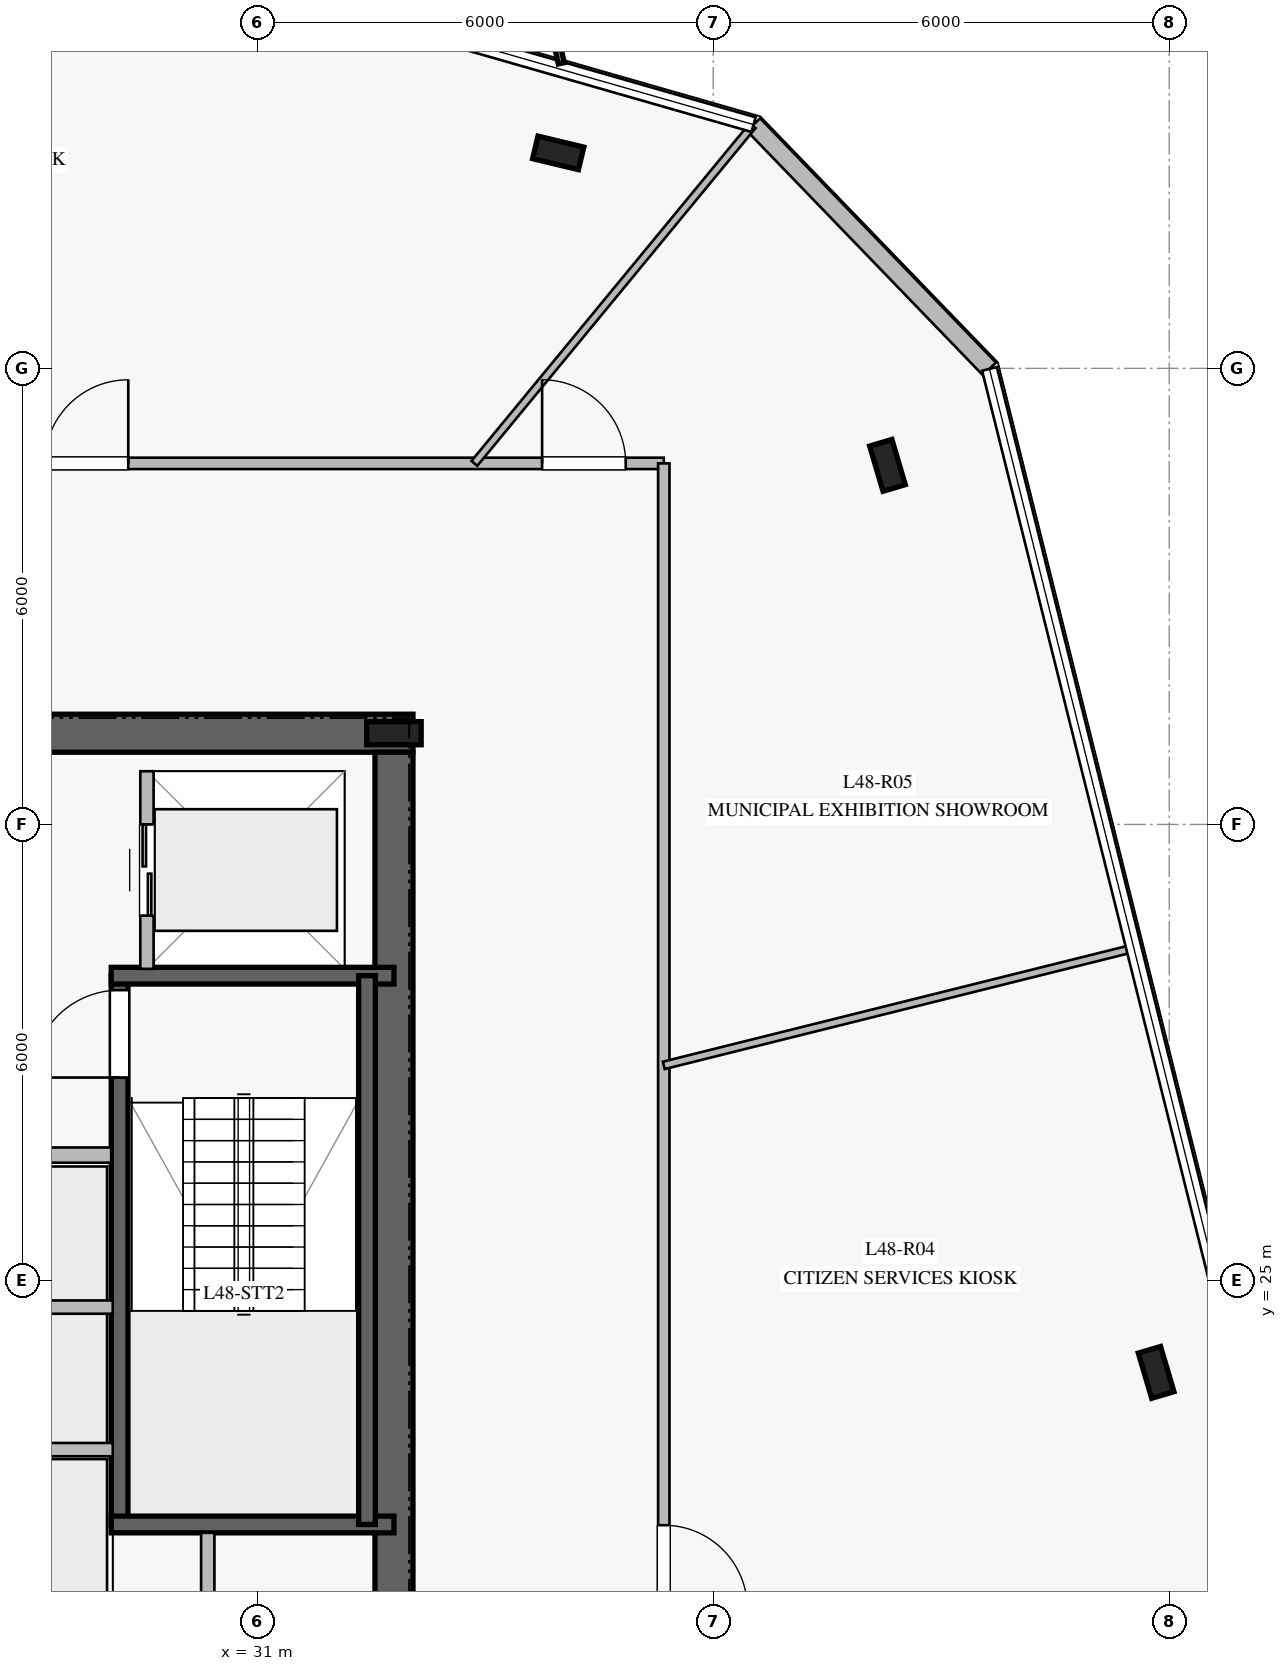
"""IFC4 building model, lengths in metres.
Left out: names, types, materials, properties, quantities, classifications, styles, units other than length and angle.
Written with IfcOpenShell. Run it as: python <this file> out.ifc"""

import sys

from ifc_helpers import new_model, si_unit, direction, frame, frame_2d, origin, origin_2d, place, context, subcontext, project, spatial, rectangle, i_section, extrude, element, fill, save


model = new_model("IFC4")
c1 = context("Model", 3, precision=1e-05, world=origin(), true_north=direction((0.0, 1.0)))
c2 = subcontext(c1, "Body", "Model", "MODEL_VIEW")
j1 = project(units=[si_unit("LENGTHUNIT", "METRE"), si_unit("PLANEANGLEUNIT", "RADIAN")], contexts=[c1])
p1 = place(None, origin())
s1 = spatial("IfcSite", under=j1, at=p1, CompositionType="ELEMENT")
p2 = place(p1, origin())
s2 = spatial("IfcBuilding", under=s1, at=p2, CompositionType="ELEMENT")
p3 = place(p2, frame((0.0, 0.0, 200.8)))
s3 = spatial("IfcBuildingStorey", under=s2, at=p3, CompositionType="ELEMENT", Elevation=200.8)
p4 = place(p3, frame((33.05, 32.2, 0.0), z_axis=(0.0, 0.0, 1.0), x_axis=(-1.0, 0.0, 0.0)))
e1 = element("IfcWall", 1, at=p4, inside=s3, PredefinedType="SHEAR", context=c2, shape_type="SweptSolid", body=[
    extrude(rectangle(XDim=16.1, YDim=0.5, at=frame_2d((8.05, 0.0))), origin(), (0.0, 0.0, 1.0), 3.78),
])
p5 = place(p4, frame((5.0, 0.0, 0.0)))
e2 = element("IfcOpeningElement", 2, at=p5, cuts=e1, PredefinedType="OPENING", context=c2, shape_type="SweptSolid", body=[
    extrude(rectangle(XDim=1.2, YDim=2.25, at=frame_2d((0.6, 1.125))), frame((0.0, 0.26, 0.0), z_axis=(0.0, -1.0, 0.0), x_axis=(1.0, 0.0, 0.0)), (0.0, 0.0, 1.0), 0.52),
])
p6 = place(p4, frame((9.825, 0.0, 0.0)))
e3 = element("IfcOpeningElement", 3, at=p6, cuts=e1, PredefinedType="OPENING", context=c2, shape_type="SweptSolid", body=[
    extrude(rectangle(XDim=1.1, YDim=2.2, at=frame_2d((0.55, 1.1))), frame((0.0, 0.26, 0.0), z_axis=(0.0, -1.0, 0.0), x_axis=(1.0, 0.0, 0.0)), (0.0, 0.0, 1.0), 0.52),
])
p7 = place(p3, frame((32.8, 18.05, 0.0), z_axis=(0.0, 0.0, 1.0), x_axis=(0.0, 1.0, 0.0)))
e4 = element("IfcWall", 4, at=p7, inside=s3, PredefinedType="SHEAR", context=c2, shape_type="SweptSolid", body=[
    extrude(rectangle(XDim=13.9, YDim=0.5, at=frame_2d((6.95, 0.0))), origin(), (0.0, 0.0, 1.0), 3.78),
])
p8 = place(p3, frame((32.8, 32.2, 0.0), z_axis=(0.0, 0.0, 1.0), x_axis=(1.0, 0.0, 0.0)))
e5 = element("IfcColumn", 5, at=p8, inside=s3, PredefinedType="COLUMN", context=c2, shape_type="SweptSolid", body=[
    extrude(i_section(OverallWidth=0.304, OverallDepth=0.716, WebThickness=0.021, FlangeThickness=0.04, at=origin_2d()), origin(), (0.0, 0.0, 1.0), 4.0),
])
p9 = place(p3, frame((29.19, 21.79, 0.0), z_axis=(0.0, 0.0, 1.0), x_axis=(0.0, 1.0, 0.0)))
e6 = element("IfcWall", 6, at=p9, inside=s3, PredefinedType="SOLIDWALL", context=c2, shape_type="SweptSolid", body=[
    extrude(rectangle(XDim=7.22, YDim=0.22, at=frame_2d((3.61, 0.0))), origin(), (0.0, 0.0, 1.0), 3.78),
])
p10 = place(p9, frame((5.88, 0.0, 0.0)))
e7 = element("IfcOpeningElement", 7, at=p10, cuts=e6, PredefinedType="OPENING", context=c2, shape_type="SweptSolid", body=[
    extrude(rectangle(XDim=1.15, YDim=2.2, at=frame_2d((0.575, 1.1))), frame((0.0, 0.12, 0.0), z_axis=(0.0, -1.0, 0.0), x_axis=(1.0, 0.0, 0.0)), (0.0, 0.0, 1.0), 0.24),
])
for number, where, z_axis, x_axis in (
    (8, (29.08, 21.79, 0.0), (0.0, 0.0, 1.0), (1.0, 0.0, 0.0)),
    (9, (29.08, 29.01, 0.0), (0.0, 0.0, 1.0), (1.0, 0.0, 0.0)),
):
    element("IfcWall", number, at=place(p3, frame(where, z_axis=z_axis, x_axis=x_axis)), inside=s3, PredefinedType="SOLIDWALL", context=c2, shape_type="SweptSolid", body=[
        extrude(rectangle(XDim=3.72, YDim=0.22, at=frame_2d((1.86, 0.0))), origin(), (0.0, 0.0, 1.0), 3.78),
    ])
p11 = place(p3, frame((32.445, 29.01, 0.0), z_axis=(0.0, 0.0, 1.0), x_axis=(0.0, -1.0, 0.0)))
e10 = element("IfcWall", 10, at=p11, inside=s3, PredefinedType="SOLIDWALL", context=c2, shape_type="SweptSolid", body=[
    extrude(rectangle(XDim=7.22, YDim=0.22, at=frame_2d((3.61, 0.0))), origin(), (0.0, 0.0, 1.0), 3.78),
])
for number, where, z_axis, x_axis in (
    (11, (34.961, 39.835, 0.0), (0.0, 0.0, 1.0), (-0.972, 0.233, 0.0)),
    (12, (42.828, 23.791, 0.0), (0.0, 0.0, 1.0), (-0.284, 0.959, 0.0)),
    (13, (39.293, 35.724, 0.0), (0.0, 0.0, 1.0), (-0.284, 0.959, 0.0)),
):
    element("IfcColumn", number, at=place(p3, frame(where, z_axis=z_axis, x_axis=x_axis)), inside=s3, PredefinedType="COLUMN", context=c2, shape_type="SweptSolid", body=[
        extrude(i_section(OverallWidth=0.305, OverallDepth=0.62, WebThickness=0.021, FlangeThickness=0.04, at=origin_2d()), origin(), (0.0, 0.0, 1.0), 4.0),
    ])
p12 = place(p3, frame((43.204, 17.457, 0.0), z_axis=(0.0, 0.0, 1.0), x_axis=(0.275572820258, 0.961280198868, 0.0)))
e14 = element("IfcWall", 14, at=p12, inside=s3, PredefinedType="STANDARD", context=c2, shape_type="SweptSolid", body=[
    extrude(rectangle(XDim=4.467, YDim=0.24, at=frame_2d((2.233, 0.0))), origin(), (0.0, 0.0, 1.0), 3.78),
])
p13 = place(p3, frame((40.635, 36.993, 0.0), z_axis=(0.0, 0.0, 1.0), x_axis=(-0.69467836701, 0.719320489357, 0.0)))
e15 = element("IfcWall", 15, at=p13, inside=s3, PredefinedType="STANDARD", context=c2, shape_type="SweptSolid", body=[
    extrude(rectangle(XDim=4.468, YDim=0.24, at=frame_2d((2.234, 0.0))), origin(), (0.0, 0.0, 1.0), 3.78),
])
p14 = place(p3, frame((25.7, 26.65, 0.0), z_axis=(0.0, 0.0, 1.0), x_axis=(1.0, 0.0, 0.0)))
e16 = element("IfcWall", 16, at=p14, inside=s3, PredefinedType="PARTITIONING", context=c2, shape_type="SweptSolid", body=[
    extrude(rectangle(XDim=3.38, YDim=0.2, at=frame_2d((1.69, 0.0))), origin(), (0.0, 0.0, 1.0), 3.78),
])
p15 = place(p3, frame((30.35, 18.2, 0.0), z_axis=(0.0, 0.0, 1.0), x_axis=(0.0, 1.0, 0.0)))
e17 = element("IfcWall", 17, at=p15, inside=s3, PredefinedType="PARTITIONING", context=c2, shape_type="SweptSolid", body=[
    extrude(rectangle(XDim=3.48, YDim=0.175, at=frame_2d((1.74, 0.0))), origin(), (0.0, 0.0, 1.0), 3.78),
])
for number, where, z_axis, x_axis in (
    (18, (26.75, 22.775, 0.0), (0.0, 0.0, 1.0), (1.0, 0.0, 0.0)),
    (19, (26.75, 24.65, 0.0), (0.0, 0.0, 1.0), (1.0, 0.0, 0.0)),
):
    element("IfcWall", number, at=place(p3, frame(where, z_axis=z_axis, x_axis=x_axis)), inside=s3, PredefinedType="PARTITIONING", context=c2, shape_type="SweptSolid", body=[
        extrude(rectangle(XDim=2.35, YDim=0.175, at=frame_2d((1.175, 0.0))), origin(), (0.0, 0.0, 1.0), 3.78),
    ])
p16 = place(p3, frame((29.55, 29.1, 0.0), z_axis=(0.0, 0.0, 1.0), x_axis=(0.0, 1.0, 0.0)))
e20 = element("IfcWall", 20, at=p16, inside=s3, PredefinedType="PARTITIONING", context=c2, shape_type="SweptSolid", body=[
    extrude(rectangle(XDim=2.6, YDim=0.175, at=frame_2d((1.3, 0.0))), origin(), (0.0, 0.0, 1.0), 3.78),
])
p17 = place(p16, frame((0.7, 0.0, 0.0)))
e21 = element("IfcOpeningElement", 21, at=p17, cuts=e20, PredefinedType="OPENING", context=c2, shape_type="SweptSolid", body=[
    extrude(rectangle(XDim=1.2, YDim=2.2, at=frame_2d((0.6, 1.1))), frame((0.0, 0.098, 0.0), z_axis=(0.0, -1.0, 0.0), x_axis=(1.0, 0.0, 0.0)), (0.0, 0.0, 1.0), 0.195),
])
p18 = place(p3, frame((13.65, 35.75, 0.0), z_axis=(0.0, 0.0, 1.0), x_axis=(1.0, 0.0, 0.0)))
e22 = element("IfcWall", 22, at=p18, inside=s3, PredefinedType="PARTITIONING", context=c2, shape_type="SweptSolid", body=[
    extrude(rectangle(XDim=22.7, YDim=0.15, at=frame_2d((11.35, 0.0))), origin(), (0.0, 0.0, 1.0), 3.28),
])
p19 = place(p18, frame((21.099, 0.0, 0.0)))
e23 = element("IfcOpeningElement", 23, at=p19, cuts=e22, PredefinedType="OPENING", context=c2, shape_type="SweptSolid", body=[
    extrude(rectangle(XDim=1.1, YDim=2.2, at=frame_2d((0.55, 1.1))), frame((0.0, 0.085, 0.0), z_axis=(0.0, -1.0, 0.0), x_axis=(1.0, 0.0, 0.0)), (0.0, 0.0, 1.0), 0.17),
])
p20 = place(p18, frame((14.554, 0.0, 0.0)))
e24 = element("IfcOpeningElement", 24, at=p20, cuts=e22, PredefinedType="OPENING", context=c2, shape_type="SweptSolid", body=[
    extrude(rectangle(XDim=1.1, YDim=2.2, at=frame_2d((0.55, 1.1))), frame((0.0, 0.085, 0.0), z_axis=(0.0, -1.0, 0.0), x_axis=(1.0, 0.0, 0.0)), (0.0, 0.0, 1.0), 0.17),
])
p21 = place(p18, frame((4.597, 0.0, 0.0)))
e25 = element("IfcOpeningElement", 25, at=p21, cuts=e22, PredefinedType="OPENING", context=c2, shape_type="SweptSolid", body=[
    extrude(rectangle(XDim=1.1, YDim=2.2, at=frame_2d((0.55, 1.1))), frame((0.0, 0.085, 0.0), z_axis=(0.0, -1.0, 0.0), x_axis=(1.0, 0.0, 0.0)), (0.0, 0.0, 1.0), 0.17),
])
p22 = place(p3, frame((36.35, 35.75, 0.0), z_axis=(0.0, 0.0, 1.0), x_axis=(0.0, -1.0, 0.0)))
e26 = element("IfcWall", 26, at=p22, inside=s3, PredefinedType="PARTITIONING", context=c2, shape_type="SweptSolid", body=[
    extrude(rectangle(XDim=21.5, YDim=0.15, at=frame_2d((10.75, 0.0))), origin(), (0.0, 0.0, 1.0), 3.05),
])
p23 = place(p22, frame((13.969, 0.0, 0.0)))
e27 = element("IfcOpeningElement", 27, at=p23, cuts=e26, PredefinedType="OPENING", context=c2, shape_type="SweptSolid", body=[
    extrude(rectangle(XDim=1.1, YDim=2.2, at=frame_2d((0.55, 1.1))), frame((0.0, 0.085, 0.0), z_axis=(0.0, -1.0, 0.0), x_axis=(1.0, 0.0, 0.0)), (0.0, 0.0, 1.0), 0.17),
])
p24 = place(p3, frame((36.35, 27.83, 0.0), z_axis=(0.0, 0.0, 1.0), x_axis=(0.970304919619, 0.241885020131, 0.0)))
e28 = element("IfcWall", 28, at=p24, inside=s3, PredefinedType="MOVABLE", context=c2, shape_type="SweptSolid", body=[
    extrude(rectangle(XDim=6.358, YDim=0.1, at=frame_2d((3.179, 0.0))), origin(), (0.0, 0.0, 1.0), 3.05),
])
p25 = place(p3, frame((33.858, 35.75, 0.0), z_axis=(0.0, 0.0, 1.0), x_axis=(0.635924242857, 0.77175148678, 0.0)))
e29 = element("IfcWall", 29, at=p25, inside=s3, PredefinedType="MOVABLE", context=c2, shape_type="SweptSolid", body=[
    extrude(rectangle(XDim=5.757, YDim=0.1, at=frame_2d((2.878, 0.0))), origin(), (0.0, 0.0, 1.0), 3.18),
])
p26 = place(p10, origin())
e30 = element("IfcDoor", 30, at=p26, inside=s3, OperationType="SINGLE_SWING_LEFT", PredefinedType="DOOR", context=c2, shape_type="SweptSolid", body=[
    extrude(rectangle(XDim=1.15, YDim=2.2, at=frame_2d((0.575, 1.1))), frame((0.0, 0.025, 0.0), z_axis=(0.0, -1.0, 0.0), x_axis=(1.0, 0.0, 0.0)), (0.0, 0.0, 1.0), 0.05),
])
fill(e7, e30)
p27 = place(p17, origin())
e31 = element("IfcDoor", 31, at=p27, inside=s3, OperationType="DOUBLE_DOOR_SLIDING", PredefinedType="DOOR", context=c2, shape_type="SweptSolid", body=[
    extrude(rectangle(XDim=1.2, YDim=2.2, at=frame_2d((0.6, 1.1))), frame((0.0, 0.025, 0.0), z_axis=(0.0, -1.0, 0.0), x_axis=(1.0, 0.0, 0.0)), (0.0, 0.0, 1.0), 0.05),
])
fill(e21, e31)
p28 = place(p23, origin())
e32 = element("IfcDoor", 32, at=p28, inside=s3, OperationType="SINGLE_SWING_RIGHT", PredefinedType="DOOR", context=c2, shape_type="SweptSolid", body=[
    extrude(rectangle(XDim=1.1, YDim=2.2, at=frame_2d((0.55, 1.1))), frame((0.0, 0.025, 0.0), z_axis=(0.0, -1.0, 0.0), x_axis=(1.0, 0.0, 0.0)), (0.0, 0.0, 1.0), 0.05),
])
fill(e27, e32)
p29 = place(p19, origin())
e33 = element("IfcDoor", 33, at=p29, inside=s3, OperationType="SINGLE_SWING_LEFT", PredefinedType="DOOR", context=c2, shape_type="SweptSolid", body=[
    extrude(rectangle(XDim=1.1, YDim=2.2, at=frame_2d((0.55, 1.1))), frame((0.0, 0.025, 0.0), z_axis=(0.0, -1.0, 0.0), x_axis=(1.0, 0.0, 0.0)), (0.0, 0.0, 1.0), 0.05),
])
fill(e23, e33)
p30 = place(p20, origin())
e34 = element("IfcDoor", 34, at=p30, inside=s3, OperationType="SINGLE_SWING_RIGHT", PredefinedType="DOOR", context=c2, shape_type="SweptSolid", body=[
    extrude(rectangle(XDim=1.1, YDim=2.2, at=frame_2d((0.55, 1.1))), frame((0.0, 0.025, 0.0), z_axis=(0.0, -1.0, 0.0), x_axis=(1.0, 0.0, 0.0)), (0.0, 0.0, 1.0), 0.05),
])
fill(e24, e34)
save(model, sys.argv[1])
